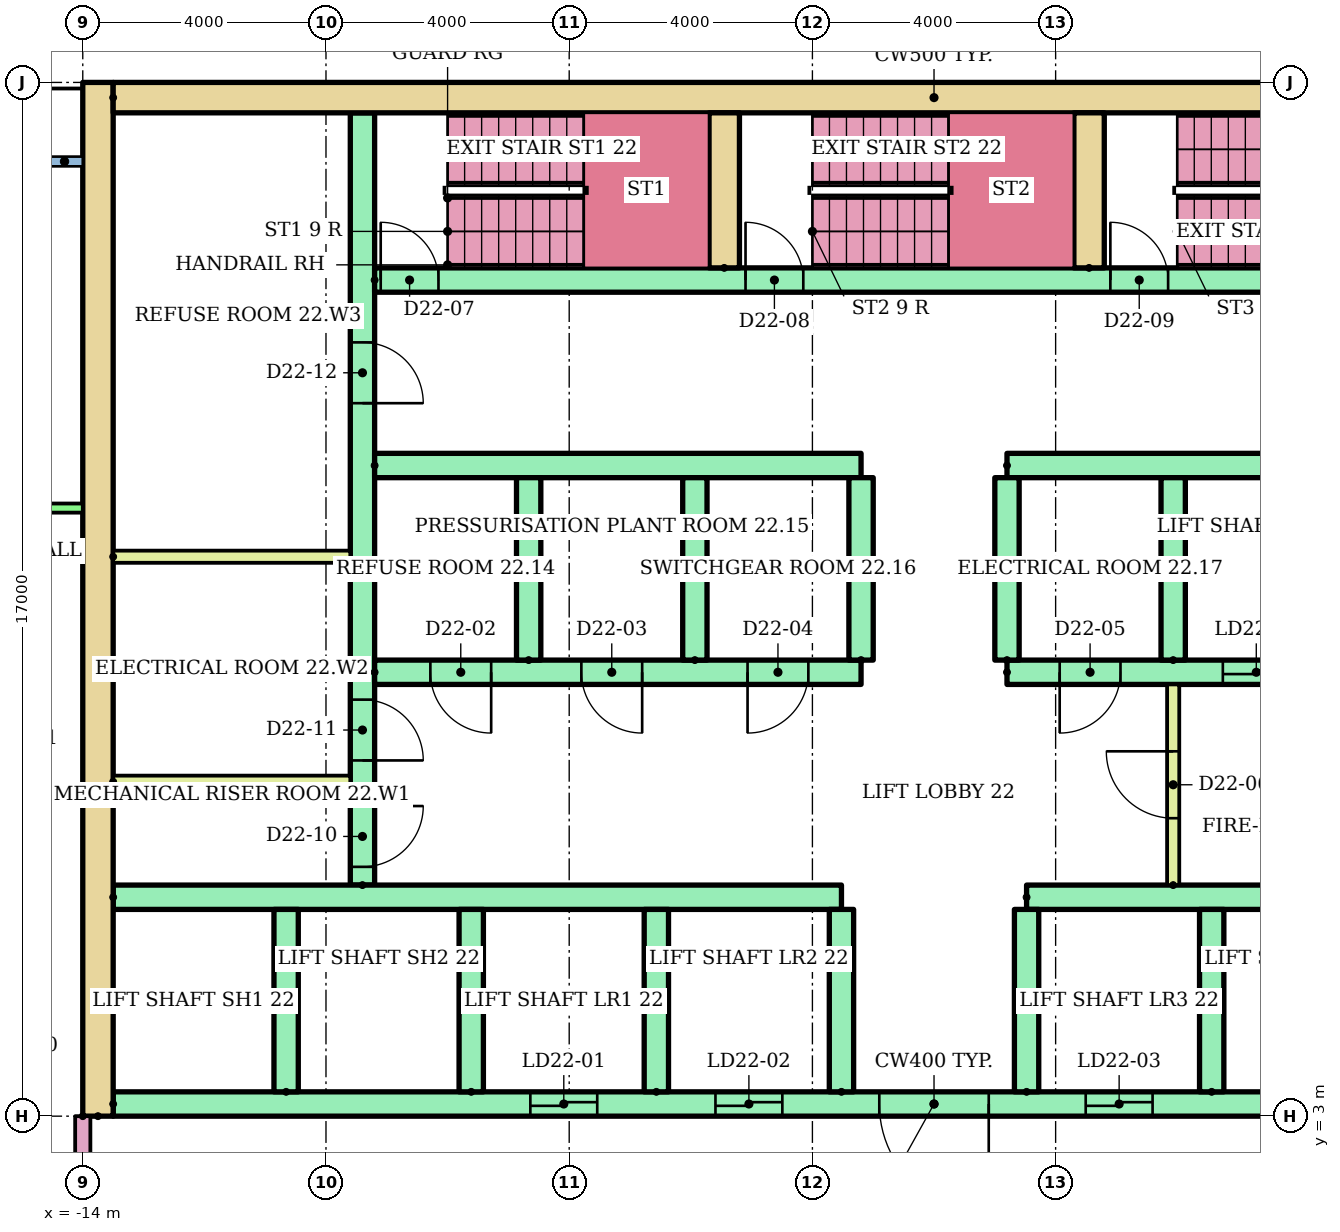
"""IFC4 building model, lengths in metres.
Left out: names, types, materials, properties, quantities, classifications, styles, units other than length and angle.
Written with IfcOpenShell. Run it as: python <this file> out.ifc"""

import sys

from ifc_helpers import new_model, si_unit, direction, frame, frame_2d, origin, place, context, subcontext, project, spatial, rectangle, extrude, element, fill, save


model = new_model("IFC4")
c1 = context("Model", 3, precision=1e-05, world=origin(), true_north=direction((0.0, 1.0)))
c2 = subcontext(c1, "Body", "Model", "MODEL_VIEW")
j1 = project(units=[si_unit("LENGTHUNIT", "METRE"), si_unit("PLANEANGLEUNIT", "RADIAN")], contexts=[c1])
p1 = place(None, origin())
s1 = spatial("IfcSite", under=j1, at=p1, CompositionType="ELEMENT")
p2 = place(p1, origin())
s2 = spatial("IfcBuilding", under=s1, at=p2, CompositionType="ELEMENT")
p3 = place(p2, frame((0.0, 0.0, 87.1)))
s3 = spatial("IfcBuildingStorey", under=s2, at=p3, CompositionType="ELEMENT", Elevation=87.1)
p4 = place(p3, frame((-13.75, 3.0, 0.0), z_axis=(0.0, 0.0, 1.0), x_axis=(0.0, 1.0, 0.0)))
e1 = element("IfcWall", 1, at=p4, inside=s3, PredefinedType="SHEAR", context=c2, shape_type="SweptSolid", body=[
    extrude(rectangle(XDim=17.0, YDim=0.5, at=frame_2d((8.5, 0.0))), origin(), (0.0, 0.0, 1.0), 2.92),
])
p5 = place(p3, frame((-13.5, 19.75, 0.0)))
e2 = element("IfcWall", 2, at=p5, inside=s3, PredefinedType="SHEAR", context=c2, shape_type="SweptSolid", body=[
    extrude(rectangle(XDim=27.0, YDim=0.5, at=frame_2d((13.5, 0.0))), origin(), (0.0, 0.0, 1.0), 2.92),
])
p6 = place(p3, frame((-9.4, 6.8, 0.0), z_axis=(0.0, 0.0, 1.0), x_axis=(0.0, 1.0, 0.0)))
e3 = element("IfcWall", 3, at=p6, inside=s3, PredefinedType="SHEAR", context=c2, shape_type="SweptSolid", body=[
    extrude(rectangle(XDim=12.7, YDim=0.4, at=frame_2d((6.35, 0.0))), origin(), (0.0, 0.0, 1.0), 2.92),
])
p7 = place(p6, frame((0.3, 0.0, 0.0)))
e4 = element("IfcOpeningElement", 4, at=p7, cuts=e3, PredefinedType="OPENING", context=c2, shape_type="SweptSolid", body=[
    extrude(rectangle(XDim=1.0, YDim=2.1, at=frame_2d((0.5, 1.05))), frame((0.0, 0.21, 0.0), z_axis=(0.0, -1.0, 0.0), x_axis=(1.0, 0.0, 0.0)), (0.0, 0.0, 1.0), 0.42),
])
p8 = place(p6, frame((2.05, 0.0, 0.0)))
e5 = element("IfcOpeningElement", 5, at=p8, cuts=e3, PredefinedType="OPENING", context=c2, shape_type="SweptSolid", body=[
    extrude(rectangle(XDim=1.0, YDim=2.1, at=frame_2d((0.5, 1.05))), frame((0.0, 0.21, 0.0), z_axis=(0.0, -1.0, 0.0), x_axis=(1.0, 0.0, 0.0)), (0.0, 0.0, 1.0), 0.42),
])
p9 = place(p6, frame((7.925, 0.0, 0.0)))
e6 = element("IfcOpeningElement", 6, at=p9, cuts=e3, PredefinedType="OPENING", context=c2, shape_type="SweptSolid", body=[
    extrude(rectangle(XDim=1.0, YDim=2.1, at=frame_2d((0.5, 1.05))), frame((0.0, 0.21, 0.0), z_axis=(0.0, -1.0, 0.0), x_axis=(1.0, 0.0, 0.0)), (0.0, 0.0, 1.0), 0.42),
])
p10 = place(p3, frame((-13.5, 3.2, 0.0)))
e7 = element("IfcWall", 7, at=p10, inside=s3, PredefinedType="SHEAR", context=c2, shape_type="SweptSolid", body=[
    extrude(rectangle(XDim=27.0, YDim=0.4, at=frame_2d((13.5, 0.0))), origin(), (0.0, 0.0, 1.0), 2.92),
])
p11 = place(p10, frame((6.861, 0.0, 0.0)))
e8 = element("IfcOpeningElement", 8, at=p11, cuts=e7, PredefinedType="OPENING", context=c2, shape_type="SweptSolid", body=[
    extrude(rectangle(XDim=1.1, YDim=2.1, at=frame_2d((0.55, 1.05))), frame((0.0, 0.21, 0.0), z_axis=(0.0, -1.0, 0.0), x_axis=(1.0, 0.0, 0.0)), (0.0, 0.0, 1.0), 0.42),
])
p12 = place(p10, frame((9.906, 0.0, 0.0)))
e9 = element("IfcOpeningElement", 9, at=p12, cuts=e7, PredefinedType="OPENING", context=c2, shape_type="SweptSolid", body=[
    extrude(rectangle(XDim=1.1, YDim=2.1, at=frame_2d((0.55, 1.05))), frame((0.0, 0.21, 0.0), z_axis=(0.0, -1.0, 0.0), x_axis=(1.0, 0.0, 0.0)), (0.0, 0.0, 1.0), 0.42),
])
p13 = place(p10, frame((15.994, 0.0, 0.0)))
e10 = element("IfcOpeningElement", 10, at=p13, cuts=e7, PredefinedType="OPENING", context=c2, shape_type="SweptSolid", body=[
    extrude(rectangle(XDim=1.1, YDim=2.1, at=frame_2d((0.55, 1.05))), frame((0.0, 0.21, 0.0), z_axis=(0.0, -1.0, 0.0), x_axis=(1.0, 0.0, 0.0)), (0.0, 0.0, 1.0), 0.42),
])
p14 = place(p10, frame((19.039, 0.0, 0.0)))
e11 = element("IfcOpeningElement", 11, at=p14, cuts=e7, PredefinedType="OPENING", context=c2, shape_type="SweptSolid", body=[
    extrude(rectangle(XDim=1.1, YDim=2.1, at=frame_2d((0.55, 1.05))), frame((0.0, 0.21, 0.0), z_axis=(0.0, -1.0, 0.0), x_axis=(1.0, 0.0, 0.0)), (0.0, 0.0, 1.0), 0.42),
])
p15 = place(p10, frame((12.6, 0.0, 0.0)))
e12 = element("IfcOpeningElement", 12, at=p15, cuts=e7, PredefinedType="OPENING", context=c2, shape_type="SweptSolid", body=[
    extrude(rectangle(XDim=1.8, YDim=2.1, at=frame_2d((0.9, 1.05))), frame((0.0, 0.21, 0.0), z_axis=(0.0, -1.0, 0.0), x_axis=(1.0, 0.0, 0.0)), (0.0, 0.0, 1.0), 0.42),
])
p16 = place(p3, frame((-13.5, 6.6, 0.0)))
e13 = element("IfcWall", 13, at=p16, inside=s3, PredefinedType="SHEAR", context=c2, shape_type="SweptSolid", body=[
    extrude(rectangle(XDim=11.978, YDim=0.4, at=frame_2d((5.989, 0.0))), origin(), (0.0, 0.0, 1.0), 2.92),
])
p17 = place(p3, frame((1.522, 6.6, 0.0)))
e14 = element("IfcWall", 14, at=p17, inside=s3, PredefinedType="SHEAR", context=c2, shape_type="SweptSolid", body=[
    extrude(rectangle(XDim=8.078, YDim=0.4, at=frame_2d((4.039, 0.0))), origin(), (0.0, 0.0, 1.0), 2.92),
])
for number, where, z_axis, x_axis in (
    (15, (-10.656, 3.4, 0.0), (0.0, 0.0, 1.0), (0.0, 1.0, 0.0)),
    (16, (-7.611, 3.4, 0.0), (0.0, 0.0, 1.0), (0.0, 1.0, 0.0)),
    (17, (-4.567, 3.4, 0.0), (0.0, 0.0, 1.0), (0.0, 1.0, 0.0)),
    (18, (-1.522, 3.4, 0.0), (0.0, 0.0, 1.0), (0.0, 1.0, 0.0)),
    (19, (1.522, 3.4, 0.0), (0.0, 0.0, 1.0), (0.0, 1.0, 0.0)),
    (20, (4.567, 3.4, 0.0), (0.0, 0.0, 1.0), (0.0, 1.0, 0.0)),
):
    element("IfcWall", number, at=place(p3, frame(where, z_axis=z_axis, x_axis=x_axis)), inside=s3, PredefinedType="SHEAR", context=c2, shape_type="SweptSolid", body=[
        extrude(rectangle(XDim=3.0, YDim=0.4, at=frame_2d((1.5, 0.0))), origin(), (0.0, 0.0, 1.0), 2.92),
    ])
p18 = place(p3, frame((-9.2, 10.3, 0.0)))
e21 = element("IfcWall", 21, at=p18, inside=s3, PredefinedType="SHEAR", context=c2, shape_type="SweptSolid", body=[
    extrude(rectangle(XDim=8.0, YDim=0.4, at=frame_2d((4.0, 0.0))), origin(), (0.0, 0.0, 1.0), 2.92),
])
p19 = place(p18, frame((0.917, 0.0, 0.0)))
e22 = element("IfcOpeningElement", 22, at=p19, cuts=e21, PredefinedType="OPENING", context=c2, shape_type="SweptSolid", body=[
    extrude(rectangle(XDim=1.0, YDim=2.1, at=frame_2d((0.5, 1.05))), frame((0.0, 0.21, 0.0), z_axis=(0.0, -1.0, 0.0), x_axis=(1.0, 0.0, 0.0)), (0.0, 0.0, 1.0), 0.42),
])
p20 = place(p18, frame((3.4, 0.0, 0.0)))
e23 = element("IfcOpeningElement", 23, at=p20, cuts=e21, PredefinedType="OPENING", context=c2, shape_type="SweptSolid", body=[
    extrude(rectangle(XDim=1.0, YDim=2.1, at=frame_2d((0.5, 1.05))), frame((0.0, 0.21, 0.0), z_axis=(0.0, -1.0, 0.0), x_axis=(1.0, 0.0, 0.0)), (0.0, 0.0, 1.0), 0.42),
])
p21 = place(p18, frame((6.133, 0.0, 0.0)))
e24 = element("IfcOpeningElement", 24, at=p21, cuts=e21, PredefinedType="OPENING", context=c2, shape_type="SweptSolid", body=[
    extrude(rectangle(XDim=1.0, YDim=2.1, at=frame_2d((0.5, 1.05))), frame((0.0, 0.21, 0.0), z_axis=(0.0, -1.0, 0.0), x_axis=(1.0, 0.0, 0.0)), (0.0, 0.0, 1.0), 0.42),
])
p22 = place(p3, frame((-9.2, 13.7, 0.0)))
e25 = element("IfcWall", 25, at=p22, inside=s3, PredefinedType="SHEAR", context=c2, shape_type="SweptSolid", body=[
    extrude(rectangle(XDim=8.0, YDim=0.4, at=frame_2d((4.0, 0.0))), origin(), (0.0, 0.0, 1.0), 2.92),
])
p23 = place(p3, frame((1.2, 10.3, 0.0)))
e26 = element("IfcWall", 26, at=p23, inside=s3, PredefinedType="SHEAR", context=c2, shape_type="SweptSolid", body=[
    extrude(rectangle(XDim=8.0, YDim=0.4, at=frame_2d((4.0, 0.0))), origin(), (0.0, 0.0, 1.0), 2.92),
])
p24 = place(p23, frame((3.55, 0.0, 0.0)))
e27 = element("IfcOpeningElement", 27, at=p24, cuts=e26, PredefinedType="OPENING", context=c2, shape_type="SweptSolid", body=[
    extrude(rectangle(XDim=1.1, YDim=2.1, at=frame_2d((0.55, 1.05))), frame((0.0, 0.21, 0.0), z_axis=(0.0, -1.0, 0.0), x_axis=(1.0, 0.0, 0.0)), (0.0, 0.0, 1.0), 0.42),
])
p25 = place(p23, frame((6.283, 0.0, 0.0)))
e28 = element("IfcOpeningElement", 28, at=p25, cuts=e26, PredefinedType="OPENING", context=c2, shape_type="SweptSolid", body=[
    extrude(rectangle(XDim=1.1, YDim=2.1, at=frame_2d((0.55, 1.05))), frame((0.0, 0.21, 0.0), z_axis=(0.0, -1.0, 0.0), x_axis=(1.0, 0.0, 0.0)), (0.0, 0.0, 1.0), 0.42),
])
p26 = place(p23, frame((0.867, 0.0, 0.0)))
e29 = element("IfcOpeningElement", 29, at=p26, cuts=e26, PredefinedType="OPENING", context=c2, shape_type="SweptSolid", body=[
    extrude(rectangle(XDim=1.0, YDim=2.1, at=frame_2d((0.5, 1.05))), frame((0.0, 0.21, 0.0), z_axis=(0.0, -1.0, 0.0), x_axis=(1.0, 0.0, 0.0)), (0.0, 0.0, 1.0), 0.42),
])
p27 = place(p3, frame((1.2, 13.7, 0.0)))
e30 = element("IfcWall", 30, at=p27, inside=s3, PredefinedType="SHEAR", context=c2, shape_type="SweptSolid", body=[
    extrude(rectangle(XDim=8.0, YDim=0.4, at=frame_2d((4.0, 0.0))), origin(), (0.0, 0.0, 1.0), 2.92),
])
for number, where, z_axis, x_axis in (
    (31, (-6.667, 10.5, 0.0), (0.0, 0.0, 1.0), (0.0, 1.0, 0.0)),
    (32, (-3.933, 10.5, 0.0), (0.0, 0.0, 1.0), (0.0, 1.0, 0.0)),
    (33, (-1.2, 10.5, 0.0), (0.0, 0.0, 1.0), (0.0, 1.0, 0.0)),
    (34, (1.2, 10.5, 0.0), (0.0, 0.0, 1.0), (0.0, 1.0, 0.0)),
    (35, (3.933, 10.5, 0.0), (0.0, 0.0, 1.0), (0.0, 1.0, 0.0)),
):
    element("IfcWall", number, at=place(p3, frame(where, z_axis=z_axis, x_axis=x_axis)), inside=s3, PredefinedType="SHEAR", context=c2, shape_type="SweptSolid", body=[
        extrude(rectangle(XDim=3.0, YDim=0.4, at=frame_2d((1.5, 0.0))), origin(), (0.0, 0.0, 1.0), 2.92),
    ])
p28 = place(p3, frame((3.933, 6.8, 0.0), z_axis=(0.0, 0.0, 1.0), x_axis=(0.0, 1.0, 0.0)))
e36 = element("IfcWall", 36, at=p28, inside=s3, PredefinedType="PARTITIONING", context=c2, shape_type="SweptSolid", body=[
    extrude(rectangle(XDim=3.3, YDim=0.2, at=frame_2d((1.65, 0.0))), origin(), (0.0, 0.0, 1.0), 2.92),
])
p29 = place(p28, frame((1.1, 0.0, 0.0)))
e37 = element("IfcOpeningElement", 37, at=p29, cuts=e36, PredefinedType="OPENING", context=c2, shape_type="SweptSolid", body=[
    extrude(rectangle(XDim=1.1, YDim=2.1, at=frame_2d((0.55, 1.05))), frame((0.0, 0.11, 0.0), z_axis=(0.0, -1.0, 0.0), x_axis=(1.0, 0.0, 0.0)), (0.0, 0.0, 1.0), 0.22),
])
p30 = place(p3, frame((-9.2, 16.75, 0.0)))
e38 = element("IfcWall", 38, at=p30, inside=s3, PredefinedType="SHEAR", context=c2, shape_type="SweptSolid", body=[
    extrude(rectangle(XDim=18.4, YDim=0.4, at=frame_2d((9.2, 0.0))), origin(), (0.0, 0.0, 1.0), 2.92),
])
p31 = place(p30, frame((0.1, 0.0, 0.0)))
e39 = element("IfcOpeningElement", 39, at=p31, cuts=e38, PredefinedType="OPENING", context=c2, shape_type="SweptSolid", body=[
    extrude(rectangle(XDim=0.95, YDim=2.1, at=frame_2d((0.475, 1.05))), frame((0.0, 0.21, 0.0), z_axis=(0.0, -1.0, 0.0), x_axis=(1.0, 0.0, 0.0)), (0.0, 0.0, 1.0), 0.42),
])
p32 = place(p30, frame((6.1, 0.0, 0.0)))
e40 = element("IfcOpeningElement", 40, at=p32, cuts=e38, PredefinedType="OPENING", context=c2, shape_type="SweptSolid", body=[
    extrude(rectangle(XDim=0.95, YDim=2.1, at=frame_2d((0.475, 1.05))), frame((0.0, 0.21, 0.0), z_axis=(0.0, -1.0, 0.0), x_axis=(1.0, 0.0, 0.0)), (0.0, 0.0, 1.0), 0.42),
])
p33 = place(p30, frame((12.1, 0.0, 0.0)))
e41 = element("IfcOpeningElement", 41, at=p33, cuts=e38, PredefinedType="OPENING", context=c2, shape_type="SweptSolid", body=[
    extrude(rectangle(XDim=0.95, YDim=2.1, at=frame_2d((0.475, 1.05))), frame((0.0, 0.21, 0.0), z_axis=(0.0, -1.0, 0.0), x_axis=(1.0, 0.0, 0.0)), (0.0, 0.0, 1.0), 0.42),
])
for number, where, z_axis, x_axis in (
    (42, (-3.45, 16.95, 0.0), (0.0, 0.0, 1.0), (0.0, 1.0, 0.0)),
    (43, (2.55, 16.95, 0.0), (0.0, 0.0, 1.0), (0.0, 1.0, 0.0)),
):
    element("IfcWall", number, at=place(p3, frame(where, z_axis=z_axis, x_axis=x_axis)), inside=s3, PredefinedType="SHEAR", context=c2, shape_type="SweptSolid", body=[
        extrude(rectangle(XDim=2.55, YDim=0.5, at=frame_2d((1.275, 0.0))), origin(), (0.0, 0.0, 1.0), 2.92),
    ])
for number, where in (
    (44, (-13.5, 8.5, 0.0)),
    (45, (-13.5, 12.2, 0.0)),
):
    element("IfcWall", number, at=place(p3, frame(where)), inside=s3, PredefinedType="PARTITIONING", context=c2, shape_type="SweptSolid", body=[
        extrude(rectangle(XDim=3.9, YDim=0.2, at=frame_2d((1.95, 0.0))), origin(), (0.0, 0.0, 1.0), 2.92),
    ])
p34 = place(p3, frame((-28.62, 13.0, 0.0)))
e46 = element("IfcWall", 46, at=p34, inside=s3, PredefinedType="PARTITIONING", context=c2, shape_type="SweptSolid", body=[
    extrude(rectangle(XDim=14.62, YDim=0.15, at=frame_2d((7.31, 0.0))), origin(), (0.0, 0.0, 1.0), 2.4),
])
p35 = place(p34, frame((1.97, 0.0, 0.0)))
e47 = element("IfcOpeningElement", 47, at=p35, cuts=e46, PredefinedType="OPENING", context=c2, shape_type="SweptSolid", body=[
    extrude(rectangle(XDim=1.0, YDim=2.1, at=frame_2d((0.5, 1.05))), frame((0.0, 0.085, 0.0), z_axis=(0.0, -1.0, 0.0), x_axis=(1.0, 0.0, 0.0)), (0.0, 0.0, 1.0), 0.17),
])
p36 = place(p34, frame((9.22, 0.0, 0.0)))
e48 = element("IfcOpeningElement", 48, at=p36, cuts=e46, PredefinedType="OPENING", context=c2, shape_type="SweptSolid", body=[
    extrude(rectangle(XDim=0.9, YDim=2.1, at=frame_2d((0.45, 1.05))), frame((0.0, 0.085, 0.0), z_axis=(0.0, -1.0, 0.0), x_axis=(1.0, 0.0, 0.0)), (0.0, 0.0, 1.0), 0.17),
])
p37 = place(p3, frame((-14.0, 3.0, 0.0), z_axis=(0.0, 0.0, 1.0), x_axis=(0.0, -1.0, 0.0)))
e49 = element("IfcWall", 49, at=p37, inside=s3, PredefinedType="PARTITIONING", context=c2, shape_type="SweptSolid", body=[
    extrude(rectangle(XDim=1.6, YDim=0.25, at=frame_2d((0.8, 0.0))), origin(), (0.0, 0.0, 1.0), 2.4),
])
p38 = place(p11, origin())
e50 = element("IfcDoor", 50, at=p38, inside=s3, OperationType="SLIDING_TO_LEFT", PredefinedType="DOOR", context=c2, shape_type="SweptSolid", body=[
    extrude(rectangle(XDim=1.1, YDim=2.1, at=frame_2d((0.55, 1.05))), frame((0.0, 0.025, 0.0), z_axis=(0.0, -1.0, 0.0), x_axis=(1.0, 0.0, 0.0)), (0.0, 0.0, 1.0), 0.05),
])
fill(e8, e50)
p39 = place(p12, origin())
e51 = element("IfcDoor", 51, at=p39, inside=s3, OperationType="SLIDING_TO_LEFT", PredefinedType="DOOR", context=c2, shape_type="SweptSolid", body=[
    extrude(rectangle(XDim=1.1, YDim=2.1, at=frame_2d((0.55, 1.05))), frame((0.0, 0.025, 0.0), z_axis=(0.0, -1.0, 0.0), x_axis=(1.0, 0.0, 0.0)), (0.0, 0.0, 1.0), 0.05),
])
fill(e9, e51)
p40 = place(p13, origin())
e52 = element("IfcDoor", 52, at=p40, inside=s3, OperationType="SLIDING_TO_LEFT", PredefinedType="DOOR", context=c2, shape_type="SweptSolid", body=[
    extrude(rectangle(XDim=1.1, YDim=2.1, at=frame_2d((0.55, 1.05))), frame((0.0, 0.025, 0.0), z_axis=(0.0, -1.0, 0.0), x_axis=(1.0, 0.0, 0.0)), (0.0, 0.0, 1.0), 0.05),
])
fill(e10, e52)
p41 = place(p15, frame((1.8, 0.0, 0.0), z_axis=(0.0, 0.0, 1.0), x_axis=(-1.0, 0.0, 0.0)))
e53 = element("IfcDoor", 53, at=p41, inside=s3, OperationType="DOUBLE_DOOR_SINGLE_SWING", PredefinedType="DOOR", context=c2, shape_type="SweptSolid", body=[
    extrude(rectangle(XDim=1.8, YDim=2.1, at=frame_2d((0.9, 1.05))), frame((0.0, 0.025, 0.0), z_axis=(0.0, -1.0, 0.0), x_axis=(1.0, 0.0, 0.0)), (0.0, 0.0, 1.0), 0.05),
])
fill(e12, e53)
p42 = place(p24, origin())
e54 = element("IfcDoor", 54, at=p42, inside=s3, OperationType="SLIDING_TO_LEFT", PredefinedType="DOOR", context=c2, shape_type="SweptSolid", body=[
    extrude(rectangle(XDim=1.1, YDim=2.1, at=frame_2d((0.55, 1.05))), frame((0.0, 0.025, 0.0), z_axis=(0.0, -1.0, 0.0), x_axis=(1.0, 0.0, 0.0)), (0.0, 0.0, 1.0), 0.05),
])
fill(e27, e54)
p43 = place(p19, frame((1.0, 0.0, 0.0), z_axis=(0.0, 0.0, 1.0), x_axis=(-1.0, 0.0, 0.0)))
e55 = element("IfcDoor", 55, at=p43, inside=s3, OperationType="SINGLE_SWING_RIGHT", PredefinedType="DOOR", context=c2, shape_type="SweptSolid", body=[
    extrude(rectangle(XDim=1.0, YDim=2.1, at=frame_2d((0.5, 1.05))), frame((0.0, 0.025, 0.0), z_axis=(0.0, -1.0, 0.0), x_axis=(1.0, 0.0, 0.0)), (0.0, 0.0, 1.0), 0.05),
])
fill(e22, e55)
p44 = place(p20, frame((1.0, 0.0, 0.0), z_axis=(0.0, 0.0, 1.0), x_axis=(-1.0, 0.0, 0.0)))
e56 = element("IfcDoor", 56, at=p44, inside=s3, OperationType="SINGLE_SWING_RIGHT", PredefinedType="DOOR", context=c2, shape_type="SweptSolid", body=[
    extrude(rectangle(XDim=1.0, YDim=2.1, at=frame_2d((0.5, 1.05))), frame((0.0, 0.025, 0.0), z_axis=(0.0, -1.0, 0.0), x_axis=(1.0, 0.0, 0.0)), (0.0, 0.0, 1.0), 0.05),
])
fill(e23, e56)
p45 = place(p21, frame((1.0, 0.0, 0.0), z_axis=(0.0, 0.0, 1.0), x_axis=(-1.0, 0.0, 0.0)))
e57 = element("IfcDoor", 57, at=p45, inside=s3, OperationType="SINGLE_SWING_LEFT", PredefinedType="DOOR", context=c2, shape_type="SweptSolid", body=[
    extrude(rectangle(XDim=1.0, YDim=2.1, at=frame_2d((0.5, 1.05))), frame((0.0, 0.025, 0.0), z_axis=(0.0, -1.0, 0.0), x_axis=(1.0, 0.0, 0.0)), (0.0, 0.0, 1.0), 0.05),
])
fill(e24, e57)
p46 = place(p26, frame((1.0, 0.0, 0.0), z_axis=(0.0, 0.0, 1.0), x_axis=(-1.0, 0.0, 0.0)))
e58 = element("IfcDoor", 58, at=p46, inside=s3, OperationType="SINGLE_SWING_LEFT", PredefinedType="DOOR", context=c2, shape_type="SweptSolid", body=[
    extrude(rectangle(XDim=1.0, YDim=2.1, at=frame_2d((0.5, 1.05))), frame((0.0, 0.025, 0.0), z_axis=(0.0, -1.0, 0.0), x_axis=(1.0, 0.0, 0.0)), (0.0, 0.0, 1.0), 0.05),
])
fill(e29, e58)
p47 = place(p29, origin())
e59 = element("IfcDoor", 59, at=p47, inside=s3, OperationType="SINGLE_SWING_RIGHT", PredefinedType="DOOR", context=c2, shape_type="SweptSolid", body=[
    extrude(rectangle(XDim=1.1, YDim=2.1, at=frame_2d((0.55, 1.05))), frame((0.0, 0.025, 0.0), z_axis=(0.0, -1.0, 0.0), x_axis=(1.0, 0.0, 0.0)), (0.0, 0.0, 1.0), 0.05),
])
fill(e37, e59)
p48 = place(p31, origin())
e60 = element("IfcDoor", 60, at=p48, inside=s3, OperationType="SINGLE_SWING_LEFT", PredefinedType="DOOR", context=c2, shape_type="SweptSolid", body=[
    extrude(rectangle(XDim=0.95, YDim=2.1, at=frame_2d((0.475, 1.05))), frame((0.0, 0.025, 0.0), z_axis=(0.0, -1.0, 0.0), x_axis=(1.0, 0.0, 0.0)), (0.0, 0.0, 1.0), 0.05),
])
fill(e39, e60)
p49 = place(p32, origin())
e61 = element("IfcDoor", 61, at=p49, inside=s3, OperationType="SINGLE_SWING_LEFT", PredefinedType="DOOR", context=c2, shape_type="SweptSolid", body=[
    extrude(rectangle(XDim=0.95, YDim=2.1, at=frame_2d((0.475, 1.05))), frame((0.0, 0.025, 0.0), z_axis=(0.0, -1.0, 0.0), x_axis=(1.0, 0.0, 0.0)), (0.0, 0.0, 1.0), 0.05),
])
fill(e40, e61)
p50 = place(p33, origin())
e62 = element("IfcDoor", 62, at=p50, inside=s3, OperationType="SINGLE_SWING_LEFT", PredefinedType="DOOR", context=c2, shape_type="SweptSolid", body=[
    extrude(rectangle(XDim=0.95, YDim=2.1, at=frame_2d((0.475, 1.05))), frame((0.0, 0.025, 0.0), z_axis=(0.0, -1.0, 0.0), x_axis=(1.0, 0.0, 0.0)), (0.0, 0.0, 1.0), 0.05),
])
fill(e41, e62)
p51 = place(p7, frame((1.0, 0.0, 0.0), z_axis=(0.0, 0.0, 1.0), x_axis=(-1.0, 0.0, 0.0)))
e63 = element("IfcDoor", 63, at=p51, inside=s3, OperationType="SINGLE_SWING_RIGHT", PredefinedType="DOOR", context=c2, shape_type="SweptSolid", body=[
    extrude(rectangle(XDim=1.0, YDim=2.1, at=frame_2d((0.5, 1.05))), frame((0.0, 0.025, 0.0), z_axis=(0.0, -1.0, 0.0), x_axis=(1.0, 0.0, 0.0)), (0.0, 0.0, 1.0), 0.05),
])
fill(e4, e63)
p52 = place(p8, frame((1.0, 0.0, 0.0), z_axis=(0.0, 0.0, 1.0), x_axis=(-1.0, 0.0, 0.0)))
e64 = element("IfcDoor", 64, at=p52, inside=s3, OperationType="SINGLE_SWING_LEFT", PredefinedType="DOOR", context=c2, shape_type="SweptSolid", body=[
    extrude(rectangle(XDim=1.0, YDim=2.1, at=frame_2d((0.5, 1.05))), frame((0.0, 0.025, 0.0), z_axis=(0.0, -1.0, 0.0), x_axis=(1.0, 0.0, 0.0)), (0.0, 0.0, 1.0), 0.05),
])
fill(e5, e64)
p53 = place(p9, frame((1.0, 0.0, 0.0), z_axis=(0.0, 0.0, 1.0), x_axis=(-1.0, 0.0, 0.0)))
e65 = element("IfcDoor", 65, at=p53, inside=s3, OperationType="SINGLE_SWING_LEFT", PredefinedType="DOOR", context=c2, shape_type="SweptSolid", body=[
    extrude(rectangle(XDim=1.0, YDim=2.1, at=frame_2d((0.5, 1.05))), frame((0.0, 0.025, 0.0), z_axis=(0.0, -1.0, 0.0), x_axis=(1.0, 0.0, 0.0)), (0.0, 0.0, 1.0), 0.05),
])
fill(e6, e65)
save(model, sys.argv[1])
